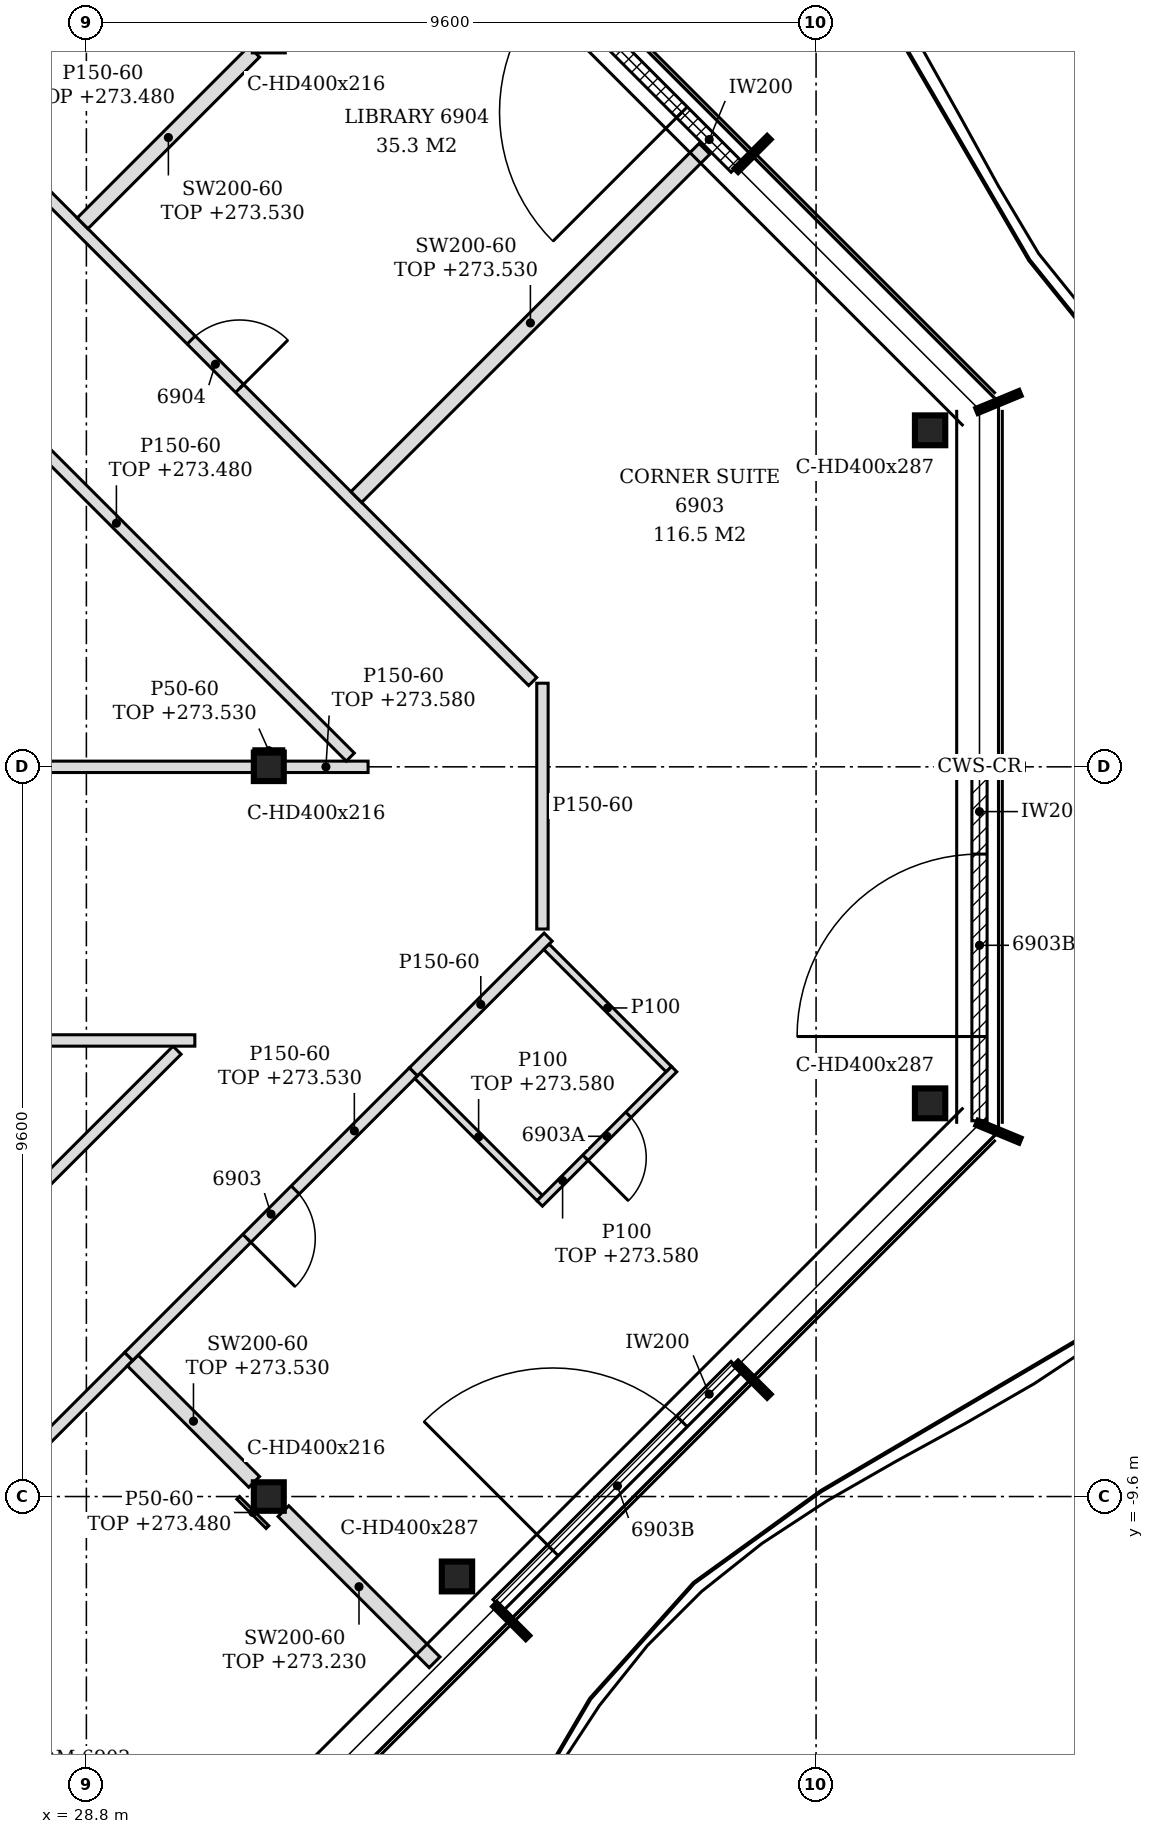
"""IFC4 building model, lengths in metres.
Left out: names, types, materials, properties, quantities, classifications, styles, units other than length and angle.
Written with IfcOpenShell. Run it as: python <this file> out.ifc"""

import sys

from ifc_helpers import new_model, si_unit, direction, frame, frame_2d, origin, origin_2d, place, context, subcontext, project, spatial, polyline, rectangle, i_section, outline, extrude, element, fill, save


model = new_model("IFC4")
c1 = context("Model", 3, precision=1e-05, world=origin(), true_north=direction((0.0, 1.0)))
c2 = subcontext(c1, "Body", "Model", "MODEL_VIEW")
j1 = project(units=[si_unit("LENGTHUNIT", "METRE"), si_unit("PLANEANGLEUNIT", "RADIAN")], contexts=[c1])
p1 = place(None, origin())
s1 = spatial("IfcSite", under=j1, at=p1, CompositionType="ELEMENT")
p2 = place(p1, origin())
s2 = spatial("IfcBuilding", under=s1, at=p2, CompositionType="ELEMENT")
p3 = place(p2, frame((0.0, 0.0, 270.6)))
s3 = spatial("IfcBuildingStorey", under=s2, at=p3, CompositionType="ELEMENT", Elevation=270.6)
for number, where, z_axis, x_axis in (
    (1, (33.676, -10.652, -0.15), (0.0, 0.0, 1.0), (1.0, 0.0, 0.0)),
    (2, (39.9, -4.427, -0.15), (0.0, 0.0, 1.0), (1.0, 0.0, 0.0)),
    (3, (39.9, 4.427, -0.15), (0.0, 0.0, 1.0), (1.0, 0.0, 0.0)),
):
    element("IfcColumn", number, at=place(p3, frame(where, z_axis=z_axis, x_axis=x_axis)), inside=s3, PredefinedType="COLUMN", context=c2, shape_type="SweptSolid", body=[
        extrude(i_section(OverallWidth=0.399, OverallDepth=0.393, WebThickness=0.023, FlangeThickness=0.037, FilletRadius=0.015, at=origin_2d()), origin(), (0.0, 0.0, 1.0), 3.6),
    ])
for number, where, z_axis, x_axis in (
    (4, (31.2, -9.6, -0.15), (0.0, 0.0, 1.0), (1.0, 0.0, 0.0)),
    (5, (31.2, 0.0, -0.15), (0.0, 0.0, 1.0), (1.0, 0.0, 0.0)),
):
    element("IfcColumn", number, at=place(p3, frame(where, z_axis=z_axis, x_axis=x_axis)), inside=s3, PredefinedType="COLUMN", context=c2, shape_type="SweptSolid", body=[
        extrude(i_section(OverallWidth=0.394, OverallDepth=0.375, WebThickness=0.017, FlangeThickness=0.028, FilletRadius=0.015, at=origin_2d()), origin(), (0.0, 0.0, 1.0), 3.6),
    ])
p4 = place(p3, frame((34.22, -11.026, 0.0), z_axis=(0.0, 0.0, 1.0), x_axis=(0.707134329907, 0.707079231393, 0.0)))
e6 = element("IfcWall", 6, at=p4, inside=s3, PredefinedType="NOTDEFINED", context=c2, shape_type="SweptSolid", body=[
    extrude(rectangle(XDim=4.431, YDim=0.2, at=frame_2d((2.215, 0.0))), origin(), (0.0, 0.0, 1.0), 3.45),
])
p5 = place(p4, frame((1.015, 0.0, 0.0)))
e7 = element("IfcOpeningElement", 7, at=p5, cuts=e6, PredefinedType="OPENING", context=c2, shape_type="SweptSolid", body=[
    extrude(rectangle(XDim=2.4, YDim=2.4, at=frame_2d((1.2, 1.2))), frame((0.0, 0.11, 0.0), z_axis=(0.0, -1.0, 0.0), x_axis=(1.0, 0.0, 0.0)), (0.0, 0.0, 1.0), 0.22),
])
p6 = place(p3, frame((40.55, -4.656, 0.0), z_axis=(0.0, 0.0, 1.0), x_axis=(0.0, 1.0, 0.0)))
e8 = element("IfcWall", 8, at=p6, inside=s3, PredefinedType="NOTDEFINED", context=c2, shape_type="SweptSolid", body=[
    extrude(rectangle(XDim=4.626, YDim=0.2, at=frame_2d((2.313, 0.0))), origin(), (0.0, 0.0, 1.0), 3.45),
])
p7 = place(p6, frame((1.108, 0.0, 0.0)))
e9 = element("IfcOpeningElement", 9, at=p7, cuts=e8, PredefinedType="OPENING", context=c2, shape_type="SweptSolid", body=[
    extrude(rectangle(XDim=2.4, YDim=2.4, at=frame_2d((1.2, 1.2))), frame((0.0, 0.11, 0.0), z_axis=(0.0, -1.0, 0.0), x_axis=(1.0, 0.0, 0.0)), (0.0, 0.0, 1.0), 0.22),
])
p8 = place(p3, frame((37.353, 7.893, 0.0), z_axis=(0.0, 0.0, 1.0), x_axis=(-0.707134329907, 0.707079231393, 0.0)))
e10 = element("IfcWall", 10, at=p8, inside=s3, PredefinedType="NOTDEFINED", context=c2, shape_type="SweptSolid", body=[
    extrude(rectangle(XDim=4.431, YDim=0.2, at=frame_2d((2.215, 0.0))), origin(), (0.0, 0.0, 1.0), 3.45),
])
p9 = place(p8, frame((1.016, 0.0, 0.0)))
e11 = element("IfcOpeningElement", 11, at=p9, cuts=e10, PredefinedType="OPENING", context=c2, shape_type="SweptSolid", body=[
    extrude(rectangle(XDim=2.4, YDim=2.4, at=frame_2d((1.2, 1.2))), frame((0.0, 0.11, 0.0), z_axis=(0.0, -1.0, 0.0), x_axis=(1.0, 0.0, 0.0)), (0.0, 0.0, 1.0), 0.22),
])
p10 = place(p3, frame((23.845, -13.27, 0.0), z_axis=(0.0, 0.0, 1.0), x_axis=(0.707044144392, 0.707169412433, 0.0)))
e12 = element("IfcWall", 12, at=p10, inside=s3, PredefinedType="PARTITIONING", context=c2, shape_type="SweptSolid", body=[
    extrude(rectangle(XDim=7.796, YDim=0.15, at=frame_2d((3.898, 0.0))), origin(), (0.0, 0.0, 1.0), 2.88),
])
p11 = place(p10, frame((3.448, 0.0, 0.0)))
e13 = element("IfcOpeningElement", 13, at=p11, cuts=e12, PredefinedType="OPENING", context=c2, shape_type="SweptSolid", body=[
    extrude(rectangle(XDim=0.9, YDim=2.1, at=frame_2d((0.45, 1.05))), frame((0.0, 0.085, 0.0), z_axis=(0.0, -1.0, 0.0), x_axis=(1.0, 0.0, 0.0)), (0.0, 0.0, 1.0), 0.17),
])
p12 = place(p3, frame((33.381, -11.781, 0.0), z_axis=(0.0, 0.0, 1.0), x_axis=(-0.707106781187, 0.707106781187, 0.0)))
e14 = element("IfcWall", 14, at=p12, inside=s3, PredefinedType="PARTITIONING", context=c2, shape_type="SweptSolid", body=[
    extrude(rectangle(XDim=2.812, YDim=0.2, at=frame_2d((1.406, 0.0))), origin(), (0.0, 0.0, 1.0), 2.63),
])
p13 = place(p3, frame((31.008, -9.408, 0.0), z_axis=(0.0, 0.0, 1.0), x_axis=(-0.707160802102, 0.707052756143, 0.0)))
e15 = element("IfcWall", 15, at=p13, inside=s3, PredefinedType="PARTITIONING", context=c2, shape_type="SweptSolid", body=[
    extrude(rectangle(XDim=2.26, YDim=0.2, at=frame_2d((1.13, 0.0))), origin(), (0.0, 0.0, 1.0), 2.93),
])
p14 = place(p3, frame((25.449, -8.272, 0.0), z_axis=(0.0, 0.0, 1.0), x_axis=(0.707106781187, 0.707106781187, 0.0)))
e16 = element("IfcWall", 16, at=p14, inside=s3, PredefinedType="PARTITIONING", context=c2, shape_type="SweptSolid", body=[
    extrude(rectangle(XDim=6.426, YDim=0.15, at=frame_2d((3.213, 0.0))), origin(), (0.0, 0.0, 1.0), 2.88),
])
p15 = place(p3, frame((29.357, -7.757, 0.0), z_axis=(0.0, 0.0, 1.0), x_axis=(0.707198954395, 0.707014595961, 0.0)))
e17 = element("IfcWall", 17, at=p15, inside=s3, PredefinedType="PARTITIONING", context=c2, shape_type="SweptSolid", body=[
    extrude(rectangle(XDim=5.297, YDim=0.15, at=frame_2d((2.648, 0.0))), origin(), (0.0, 0.0, 1.0), 2.93),
])
p16 = place(p15, frame((2.198, 0.0, 0.0)))
e18 = element("IfcOpeningElement", 18, at=p16, cuts=e17, PredefinedType="OPENING", context=c2, shape_type="SweptSolid", body=[
    extrude(rectangle(XDim=0.9, YDim=2.1, at=frame_2d((0.45, 1.05))), frame((0.0, 0.085, 0.0), z_axis=(0.0, -1.0, 0.0), x_axis=(1.0, 0.0, 0.0)), (0.0, 0.0, 1.0), 0.17),
])
p17 = place(p3, frame((34.765, -5.674, 0.0), z_axis=(0.0, 0.0, 1.0), x_axis=(-0.707106781187, 0.707106781187, 0.0)))
e19 = element("IfcWall", 19, at=p17, inside=s3, PredefinedType="PARTITIONING", context=c2, shape_type="SweptSolid", body=[
    extrude(rectangle(XDim=2.275, YDim=0.1, at=frame_2d((1.137, 0.0))), origin(), (0.0, 0.0, 1.0), 2.98),
])
p18 = place(p3, frame((34.765, -5.744, 0.0), z_axis=(0.0, 0.0, 1.0), x_axis=(0.707106781187, 0.707106781187, 0.0)))
e20 = element("IfcWall", 20, at=p18, inside=s3, PredefinedType="PARTITIONING", context=c2, shape_type="SweptSolid", body=[
    extrude(rectangle(XDim=2.5, YDim=0.1, at=frame_2d((1.25, 0.0))), origin(), (0.0, 0.0, 1.0), 2.98),
])
p19 = place(p18, frame((0.85, 0.0, 0.0)))
e21 = element("IfcOpeningElement", 21, at=p19, cuts=e20, PredefinedType="OPENING", context=c2, shape_type="SweptSolid", body=[
    extrude(rectangle(XDim=0.8, YDim=2.1, at=frame_2d((0.4, 1.05))), frame((0.0, 0.06, 0.0), z_axis=(0.0, -1.0, 0.0), x_axis=(1.0, 0.0, 0.0)), (0.0, 0.0, 1.0), 0.12),
])
p20 = place(p3, frame((33.103, -4.012, 0.0), z_axis=(0.0, 0.0, 1.0), x_axis=(0.707106781187, 0.707106781187, 0.0)))
e22 = element("IfcWall", 22, at=p20, inside=s3, PredefinedType="PARTITIONING", context=c2, shape_type="SweptSolid", body=[
    extrude(rectangle(XDim=2.506, YDim=0.15, at=frame_2d((1.253, 0.0))), origin(), (0.0, 0.0, 1.0), 3.45),
])
p21 = place(p3, frame((36.462, -3.977, 0.0), z_axis=(0.0, 0.0, 1.0), x_axis=(-0.707106781187, 0.707106781187, 0.0)))
e23 = element("IfcWall", 23, at=p21, inside=s3, PredefinedType="PARTITIONING", context=c2, shape_type="SweptSolid", body=[
    extrude(rectangle(XDim=2.275, YDim=0.1, at=frame_2d((1.137, 0.0))), origin(), (0.0, 0.0, 1.0), 3.45),
])
p22 = place(p3, frame((19.125, -3.6, 0.0), z_axis=(0.0, 0.0, 1.0), x_axis=(1.0, 0.0, 0.0)))
e24 = element("IfcWall", 24, at=p22, inside=s3, PredefinedType="PARTITIONING", context=c2, shape_type="SweptSolid", body=[
    extrude(outline(polyline([(0.0, 0.0), (11.102, 0.0), (11.102, 3.45), (0.225, 3.45), (0.223, 2.83), (0.0, 2.83), (0.0, 0.0)])), frame((0.0, 0.075, 0.0), z_axis=(0.0, -1.0, 0.0), x_axis=(1.0, 0.0, 0.0)), (0.0, 0.0, 1.0), 0.15),
])
p23 = place(p22, frame((5.086, 0.0, 0.0)))
e25 = element("IfcOpeningElement", 25, at=p23, cuts=e24, PredefinedType="OPENING", context=c2, shape_type="SweptSolid", body=[
    extrude(rectangle(XDim=0.9, YDim=2.1, at=frame_2d((0.45, 1.05))), frame((0.0, 0.085, 0.0), z_axis=(0.0, -1.0, 0.0), x_axis=(1.0, 0.0, 0.0)), (0.0, 0.0, 1.0), 0.17),
])
p24 = place(p3, frame((34.8, -2.134, 0.0), z_axis=(0.0, 0.0, 1.0), x_axis=(0.0, 1.0, 0.0)))
e26 = element("IfcWall", 26, at=p24, inside=s3, PredefinedType="PARTITIONING", context=c2, shape_type="SweptSolid", body=[
    extrude(outline(polyline([(0.0, 0.0), (3.234, 0.0), (3.234, 3.45), (2.229, 3.45), (2.227, 2.98), (2.039, 2.98), (2.037, 3.45), (0.0, 3.45), (0.0, 0.0)])), frame((0.0, 0.075, 0.0), z_axis=(0.0, -1.0, 0.0), x_axis=(1.0, 0.0, 0.0)), (0.0, 0.0, 1.0), 0.15),
])
p25 = place(p3, frame((19.125, 0.0, 0.0), z_axis=(0.0, 0.0, 1.0), x_axis=(1.0, 0.0, 0.0)))
e27 = element("IfcWall", 27, at=p25, inside=s3, PredefinedType="PARTITIONING", context=c2, shape_type="SweptSolid", body=[
    extrude(outline(polyline([(0.0, 0.0), (11.878, 0.0), (11.878, 2.88), (0.225, 2.88), (0.223, 2.83), (0.0, 2.83), (0.0, 0.0)])), frame((0.0, 0.075, 0.0), z_axis=(0.0, -1.0, 0.0), x_axis=(1.0, 0.0, 0.0)), (0.0, 0.0, 1.0), 0.15),
])
p26 = place(p3, frame((31.397, 0.0, 0.0), z_axis=(0.0, 0.0, 1.0), x_axis=(1.0, 0.0, 0.0)))
e28 = element("IfcWall", 28, at=p26, inside=s3, PredefinedType="PARTITIONING", context=c2, shape_type="SweptSolid", body=[
    extrude(rectangle(XDim=1.109, YDim=0.15, at=frame_2d((0.555, 0.0))), origin(), (0.0, 0.0, 1.0), 2.98),
])
p27 = place(p3, frame((32.272, 0.128, 0.0), z_axis=(0.0, 0.0, 1.0), x_axis=(-0.707106781187, 0.707106781187, 0.0)))
e29 = element("IfcWall", 29, at=p27, inside=s3, PredefinedType="PARTITIONING", context=c2, shape_type="SweptSolid", body=[
    extrude(rectangle(XDim=18.215, YDim=0.15, at=frame_2d((9.107, 0.0))), origin(), (0.0, 0.0, 1.0), 2.88),
])
p28 = place(p27, frame((8.703, 0.0, 0.0)))
e30 = element("IfcOpeningElement", 30, at=p28, cuts=e29, PredefinedType="OPENING", context=c2, shape_type="SweptSolid", body=[
    extrude(rectangle(XDim=0.9, YDim=2.1, at=frame_2d((0.45, 1.05))), frame((0.0, 0.085, 0.0), z_axis=(0.0, -1.0, 0.0), x_axis=(1.0, 0.0, 0.0)), (0.0, 0.0, 1.0), 0.17),
])
p29 = place(p3, frame((34.672, 1.122, 0.0), z_axis=(0.0, 0.0, 1.0), x_axis=(-0.707113927758, 0.707099634543, 0.0)))
e31 = element("IfcWall", 31, at=p29, inside=s3, PredefinedType="PARTITIONING", context=c2, shape_type="SweptSolid", body=[
    extrude(rectangle(XDim=17.081, YDim=0.15, at=frame_2d((8.541, 0.0))), origin(), (0.0, 0.0, 1.0), 2.88),
])
p30 = place(p29, frame((5.454, 0.0, 0.0)))
e32 = element("IfcOpeningElement", 32, at=p30, cuts=e31, PredefinedType="OPENING", context=c2, shape_type="SweptSolid", body=[
    extrude(rectangle(XDim=0.9, YDim=2.1, at=frame_2d((0.45, 1.05))), frame((0.0, 0.085, 0.0), z_axis=(0.0, -1.0, 0.0), x_axis=(1.0, 0.0, 0.0)), (0.0, 0.0, 1.0), 0.17),
])
p31 = place(p29, frame((11.897, 0.0, 0.0)))
e33 = element("IfcOpeningElement", 33, at=p31, cuts=e31, PredefinedType="OPENING", context=c2, shape_type="SweptSolid", body=[
    extrude(rectangle(XDim=0.9, YDim=2.1, at=frame_2d((0.45, 1.05))), frame((0.0, 0.085, 0.0), z_axis=(0.0, -1.0, 0.0), x_axis=(1.0, 0.0, 0.0)), (0.0, 0.0, 1.0), 0.17),
])
p32 = place(p3, frame((32.351, 3.549, 0.0), z_axis=(0.0, 0.0, 1.0), x_axis=(0.707106781187, 0.707106781187, 0.0)))
e34 = element("IfcWall", 34, at=p32, inside=s3, PredefinedType="PARTITIONING", context=c2, shape_type="SweptSolid", body=[
    extrude(rectangle(XDim=6.479, YDim=0.2, at=frame_2d((3.24, 0.0))), origin(), (0.0, 0.0, 1.0), 2.93),
])
p33 = place(p3, frame((28.75, 7.15, 0.0), z_axis=(0.0, 0.0, 1.0), x_axis=(0.707106781187, 0.707106781187, 0.0)))
e35 = element("IfcWall", 35, at=p33, inside=s3, PredefinedType="PARTITIONING", context=c2, shape_type="SweptSolid", body=[
    extrude(rectangle(XDim=3.193, YDim=0.2, at=frame_2d((1.597, 0.0))), origin(), (0.0, 0.0, 1.0), 2.93),
])
p34 = place(p3, frame((31.182, -10.002, 0.0), z_axis=(0.0, 0.0, 1.0), x_axis=(-0.707106781187, 0.707106781187, 0.0)))
e36 = element("IfcWall", 36, at=p34, inside=s3, PredefinedType="PARTITIONING", context=c2, shape_type="SweptSolid", body=[
    extrude(rectangle(XDim=0.544, YDim=0.05, at=frame_2d((0.272, 0.0))), origin(), (0.0, 0.0, 1.0), 2.88),
])
p35 = place(p3, frame((31.003, 0.212, 0.0), z_axis=(0.0, 0.0, 1.0), x_axis=(1.0, 0.0, 0.0)))
e37 = element("IfcWall", 37, at=p35, inside=s3, PredefinedType="PARTITIONING", context=c2, shape_type="SweptSolid", body=[
    extrude(rectangle(XDim=0.394, YDim=0.05, at=frame_2d((0.197, 0.0))), origin(), (0.0, 0.0, 1.0), 2.93),
])
p36 = place(p5, origin())
e38 = element("IfcDoor", 38, at=p36, inside=s3, OperationType="SINGLE_SWING_LEFT", PredefinedType="DOOR", context=c2, shape_type="SweptSolid", body=[
    extrude(rectangle(XDim=2.4, YDim=2.4, at=frame_2d((1.2, 1.2))), frame((0.0, 0.025, 0.0), z_axis=(0.0, -1.0, 0.0), x_axis=(1.0, 0.0, 0.0)), (0.0, 0.0, 1.0), 0.05),
])
fill(e7, e38)
p37 = place(p7, origin())
e39 = element("IfcDoor", 39, at=p37, inside=s3, OperationType="SINGLE_SWING_LEFT", PredefinedType="DOOR", context=c2, shape_type="SweptSolid", body=[
    extrude(rectangle(XDim=2.4, YDim=2.4, at=frame_2d((1.2, 1.2))), frame((0.0, 0.025, 0.0), z_axis=(0.0, -1.0, 0.0), x_axis=(1.0, 0.0, 0.0)), (0.0, 0.0, 1.0), 0.05),
])
fill(e9, e39)
p38 = place(p9, origin())
e40 = element("IfcDoor", 40, at=p38, inside=s3, OperationType="SINGLE_SWING_LEFT", PredefinedType="DOOR", context=c2, shape_type="SweptSolid", body=[
    extrude(rectangle(XDim=2.4, YDim=2.4, at=frame_2d((1.2, 1.2))), frame((0.0, 0.025, 0.0), z_axis=(0.0, -1.0, 0.0), x_axis=(1.0, 0.0, 0.0)), (0.0, 0.0, 1.0), 0.05),
])
fill(e11, e40)
p39 = place(p16, frame((0.9, 0.0, 0.0), z_axis=(0.0, 0.0, 1.0), x_axis=(-1.0, 0.0, 0.0)))
e41 = element("IfcDoor", 41, at=p39, inside=s3, OperationType="SINGLE_SWING_RIGHT", PredefinedType="DOOR", context=c2, shape_type="SweptSolid", body=[
    extrude(rectangle(XDim=0.9, YDim=2.1, at=frame_2d((0.45, 1.05))), frame((0.0, 0.025, 0.0), z_axis=(0.0, -1.0, 0.0), x_axis=(1.0, 0.0, 0.0)), (0.0, 0.0, 1.0), 0.05),
])
fill(e18, e41)
p40 = place(p19, frame((0.8, 0.0, 0.0), z_axis=(0.0, 0.0, 1.0), x_axis=(-1.0, 0.0, 0.0)))
e42 = element("IfcDoor", 42, at=p40, inside=s3, OperationType="SINGLE_SWING_RIGHT", PredefinedType="DOOR", context=c2, shape_type="SweptSolid", body=[
    extrude(rectangle(XDim=0.8, YDim=2.1, at=frame_2d((0.4, 1.05))), frame((0.0, 0.025, 0.0), z_axis=(0.0, -1.0, 0.0), x_axis=(1.0, 0.0, 0.0)), (0.0, 0.0, 1.0), 0.05),
])
fill(e21, e42)
p41 = place(p30, frame((0.9, 0.0, 0.0), z_axis=(0.0, 0.0, 1.0), x_axis=(-1.0, 0.0, 0.0)))
e43 = element("IfcDoor", 43, at=p41, inside=s3, OperationType="SINGLE_SWING_RIGHT", PredefinedType="DOOR", context=c2, shape_type="SweptSolid", body=[
    extrude(rectangle(XDim=0.9, YDim=2.1, at=frame_2d((0.45, 1.05))), frame((0.0, 0.025, 0.0), z_axis=(0.0, -1.0, 0.0), x_axis=(1.0, 0.0, 0.0)), (0.0, 0.0, 1.0), 0.05),
])
fill(e32, e43)
save(model, sys.argv[1])
